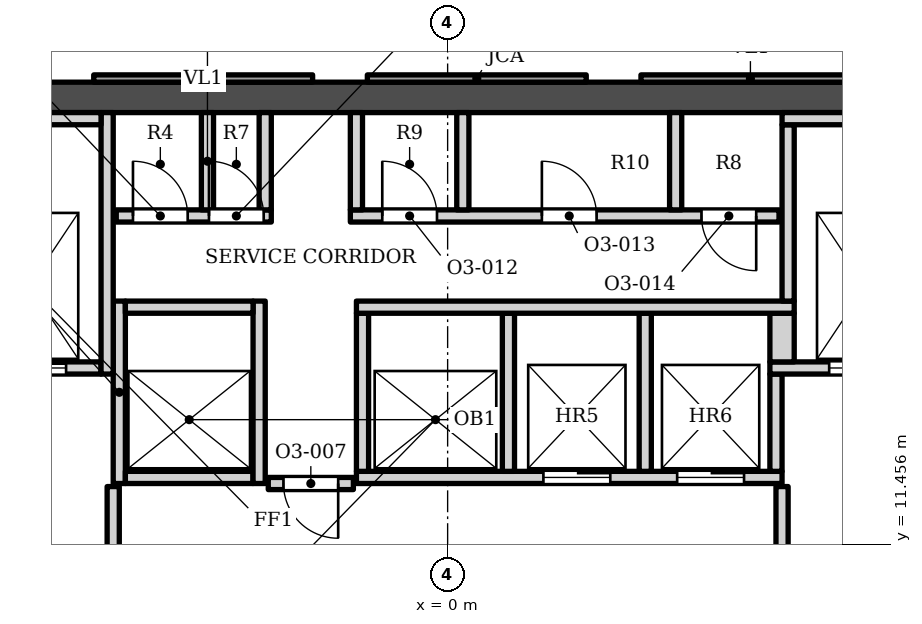
"""IFC4 building model, lengths in metres.
Left out: names, types, materials, properties, quantities, classifications, styles, units other than length and angle.
Written with IfcOpenShell. Run it as: python <this file> out.ifc"""

import sys

from ifc_helpers import new_model, si_unit, direction, frame, frame_2d, origin, place, context, subcontext, project, spatial, polyline, rectangle, outline, extrude, element, fill, save


model = new_model("IFC4")
c1 = context("Model", 3, precision=1e-05, world=origin(), true_north=direction((0.0, 1.0)))
c2 = subcontext(c1, "Body", "Model", "MODEL_VIEW")
j1 = project(units=[si_unit("LENGTHUNIT", "METRE"), si_unit("PLANEANGLEUNIT", "RADIAN")], contexts=[c1])
p1 = place(None, origin())
s1 = spatial("IfcSite", under=j1, at=p1, CompositionType="ELEMENT")
p2 = place(p1, origin())
s2 = spatial("IfcBuilding", under=s1, at=p2, CompositionType="ELEMENT")
p3 = place(p2, frame((0.0, 0.0, 168.0)))
s3 = spatial("IfcBuildingStorey", under=s2, at=p3, CompositionType="ELEMENT", Elevation=168.0)
p4 = place(p3, frame((-15.1, 18.802, 0.0), z_axis=(0.0, 0.0, 1.0), x_axis=(1.0, 0.0, 0.0)))
e1 = element("IfcWall", 1, at=p4, inside=s3, PredefinedType="SHEAR", context=c2, shape_type="SweptSolid", body=[
    extrude(rectangle(XDim=30.2, YDim=0.5, at=frame_2d((15.1, 0.0))), origin(), (0.0, 0.0, 1.0), 3.9),
])
p5 = place(p3, origin())
e2 = element("IfcWall", 2, at=p5, inside=s3, PredefinedType="ELEMENTEDWALL", context=c2, shape_type="SweptSolid", body=[
    extrude(outline(polyline([(3.18, 19.173), (3.18, 19.052), (6.78, 19.052), (6.78, 19.173), (3.18, 19.173)])), origin(), (0.0, 0.0, 1.0), 3.0),
])
p6 = place(p3, origin())
e3 = element("IfcWall", 3, at=p6, inside=s3, PredefinedType="SOLIDWALL", context=c2, shape_type="SweptSolid", body=[
    extrude(outline(polyline([(-1.32, 19.173), (-1.32, 19.052), (2.28, 19.052), (2.28, 19.173), (-1.32, 19.173)])), origin(), (0.0, 0.0, 1.0), 3.0),
])
p7 = place(p3, origin())
e4 = element("IfcWall", 4, at=p7, inside=s3, PredefinedType="ELEMENTEDWALL", context=c2, shape_type="SweptSolid", body=[
    extrude(outline(polyline([(-5.82, 19.173), (-5.82, 19.052), (-2.22, 19.052), (-2.22, 19.173), (-5.82, 19.173)])), origin(), (0.0, 0.0, 1.0), 3.0),
])
p8 = place(p3, frame((-5.5, 9.103, 0.0), z_axis=(0.0, 0.0, 1.0), x_axis=(0.0, 1.0, 0.0)))
e5 = element("IfcWall", 5, at=p8, inside=s3, PredefinedType="SOLIDWALL", context=c2, shape_type="SweptSolid", body=[
    extrude(rectangle(XDim=3.3, YDim=0.2, at=frame_2d((1.65, 0.0))), origin(), (0.0, 0.0, 1.0), 3.73),
])
p9 = place(p8, frame((0.85, 0.0, 0.0)))
e6 = element("IfcOpeningElement", 6, at=p9, cuts=e5, PredefinedType="OPENING", context=c2, shape_type="SweptSolid", body=[
    extrude(rectangle(XDim=1.4, YDim=2.1, at=frame_2d((0.7, 1.05))), frame((0.0, 0.11, 0.0), z_axis=(0.0, -1.0, 0.0), x_axis=(1.0, 0.0, 0.0)), (0.0, 0.0, 1.0), 0.22),
])
p10 = place(p3, frame((5.5, 9.103, 0.0), z_axis=(0.0, 0.0, 1.0), x_axis=(0.0, 1.0, 0.0)))
e7 = element("IfcWall", 7, at=p10, inside=s3, PredefinedType="SOLIDWALL", context=c2, shape_type="SweptSolid", body=[
    extrude(rectangle(XDim=3.3, YDim=0.2, at=frame_2d((1.65, 0.0))), origin(), (0.0, 0.0, 1.0), 3.73),
])
p11 = place(p10, frame((0.85, 0.0, 0.0)))
e8 = element("IfcOpeningElement", 8, at=p11, cuts=e7, PredefinedType="OPENING", context=c2, shape_type="SweptSolid", body=[
    extrude(rectangle(XDim=1.4, YDim=2.1, at=frame_2d((0.7, 1.05))), frame((0.0, 0.11, 0.0), z_axis=(0.0, -1.0, 0.0), x_axis=(1.0, 0.0, 0.0)), (0.0, 0.0, 1.0), 0.22),
])
p12 = place(p3, frame((-2.95, 12.453, 0.0), z_axis=(0.0, 0.0, 1.0), x_axis=(1.0, 0.0, 0.0)))
e9 = element("IfcWall", 9, at=p12, inside=s3, PredefinedType="SOLIDWALL", context=c2, shape_type="SweptSolid", body=[
    extrude(rectangle(XDim=1.4, YDim=0.2, at=frame_2d((0.7, 0.0))), origin(), (0.0, 0.0, 1.0), 3.73),
])
p13 = place(p12, frame((0.25, 0.0, 0.0)))
e10 = element("IfcOpeningElement", 10, at=p13, cuts=e9, PredefinedType="OPENING", context=c2, shape_type="SweptSolid", body=[
    extrude(rectangle(XDim=0.9, YDim=2.1, at=frame_2d((0.45, 1.05))), frame((0.0, 0.11, 0.0), z_axis=(0.0, -1.0, 0.0), x_axis=(1.0, 0.0, 0.0)), (0.0, 0.0, 1.0), 0.22),
])
p14 = place(p3, frame((-5.4, 12.453, 0.0), z_axis=(0.0, 0.0, 1.0), x_axis=(0.0, 1.0, 0.0)))
e11 = element("IfcWall", 11, at=p14, inside=s3, PredefinedType="SOLIDWALL", context=c2, shape_type="SweptSolid", body=[
    extrude(rectangle(XDim=3.0, YDim=0.2, at=frame_2d((1.5, 0.0))), origin(), (0.0, 0.0, 1.0), 3.73),
])
p15 = place(p3, frame((-5.3, 12.552, 0.0), z_axis=(0.0, 0.0, 1.0), x_axis=(1.0, 0.0, 0.0)))
e12 = element("IfcWall", 12, at=p15, inside=s3, PredefinedType="SOLIDWALL", context=c2, shape_type="SweptSolid", body=[
    extrude(rectangle(XDim=2.1, YDim=0.2, at=frame_2d((1.05, 0.0))), origin(), (0.0, 0.0, 1.0), 3.73),
])
p16 = place(p3, frame((-3.1, 12.453, 0.0), z_axis=(0.0, 0.0, 1.0), x_axis=(0.0, 1.0, 0.0)))
e13 = element("IfcWall", 13, at=p16, inside=s3, PredefinedType="SOLIDWALL", context=c2, shape_type="SweptSolid", body=[
    extrude(rectangle(XDim=3.0, YDim=0.2, at=frame_2d((1.5, 0.0))), origin(), (0.0, 0.0, 1.0), 3.73),
])
p17 = place(p3, frame((-1.5, 12.552, 0.0), z_axis=(0.0, 0.0, 1.0), x_axis=(1.0, 0.0, 0.0)))
e14 = element("IfcWall", 14, at=p17, inside=s3, PredefinedType="SOLIDWALL", context=c2, shape_type="SweptSolid", body=[
    extrude(rectangle(XDim=7.0, YDim=0.2, at=frame_2d((3.5, 0.0))), origin(), (0.0, 0.0, 1.0), 3.73),
])
p18 = place(p17, frame((3.075, 0.0, 0.0)))
e15 = element("IfcOpeningElement", 15, at=p18, cuts=e14, PredefinedType="OPENING", context=c2, shape_type="SweptSolid", body=[
    extrude(rectangle(XDim=1.1, YDim=2.1, at=frame_2d((0.55, 1.05))), frame((0.0, 0.11, 0.0), z_axis=(0.0, -1.0, 0.0), x_axis=(1.0, 0.0, 0.0)), (0.0, 0.0, 1.0), 0.22),
])
p19 = place(p17, frame((5.275, 0.0, 0.0)))
e16 = element("IfcOpeningElement", 16, at=p19, cuts=e14, PredefinedType="OPENING", context=c2, shape_type="SweptSolid", body=[
    extrude(rectangle(XDim=1.1, YDim=2.1, at=frame_2d((0.55, 1.05))), frame((0.0, 0.11, 0.0), z_axis=(0.0, -1.0, 0.0), x_axis=(1.0, 0.0, 0.0)), (0.0, 0.0, 1.0), 0.22),
])
for number, where, z_axis, x_axis in (
    (17, (-1.4, 12.653, 0.0), (0.0, 0.0, 1.0), (0.0, 1.0, 0.0)),
    (18, (1.0, 12.653, 0.0), (0.0, 0.0, 1.0), (0.0, 1.0, 0.0)),
    (19, (3.25, 12.653, 0.0), (0.0, 0.0, 1.0), (0.0, 1.0, 0.0)),
):
    element("IfcWall", number, at=place(p3, frame(where, z_axis=z_axis, x_axis=x_axis)), inside=s3, PredefinedType="SOLIDWALL", context=c2, shape_type="SweptSolid", body=[
        extrude(rectangle(XDim=2.6, YDim=0.2, at=frame_2d((1.3, 0.0))), origin(), (0.0, 0.0, 1.0), 3.73),
    ])
p20 = place(p3, frame((5.4, 12.653, 0.0), z_axis=(0.0, 0.0, 1.0), x_axis=(0.0, 1.0, 0.0)))
e20 = element("IfcWall", 20, at=p20, inside=s3, PredefinedType="SOLIDWALL", context=c2, shape_type="SweptSolid", body=[
    extrude(rectangle(XDim=1.6, YDim=0.2, at=frame_2d((0.8, 0.0))), origin(), (0.0, 0.0, 1.0), 3.73),
])
p21 = place(p3, frame((-8.05, 14.353, 0.0), z_axis=(0.0, 0.0, 1.0), x_axis=(1.0, 0.0, 0.0)))
e21 = element("IfcWall", 21, at=p21, inside=s3, PredefinedType="SOLIDWALL", context=c2, shape_type="SweptSolid", body=[
    extrude(rectangle(XDim=2.35, YDim=0.2, at=frame_2d((1.175, 0.0))), origin(), (0.0, 0.0, 1.0), 3.73),
])
p22 = place(p21, frame((0.575, 0.0, 0.0)))
e22 = element("IfcOpeningElement", 22, at=p22, cuts=e21, PredefinedType="OPENING", context=c2, shape_type="SweptSolid", body=[
    extrude(rectangle(XDim=1.2, YDim=2.1, at=frame_2d((0.6, 1.05))), frame((0.0, 0.11, 0.0), z_axis=(0.0, -1.0, 0.0), x_axis=(1.0, 0.0, 0.0)), (0.0, 0.0, 1.0), 0.22),
])
p23 = place(p3, frame((-5.6, 14.253, 0.0), z_axis=(0.0, 0.0, 1.0), x_axis=(0.0, 1.0, 0.0)))
e23 = element("IfcWall", 23, at=p23, inside=s3, PredefinedType="SOLIDWALL", context=c2, shape_type="SweptSolid", body=[
    extrude(rectangle(XDim=4.3, YDim=0.2, at=frame_2d((2.15, 0.0))), origin(), (0.0, 0.0, 1.0), 3.73),
])
p24 = place(p3, frame((5.3, 14.353, 0.0), z_axis=(0.0, 0.0, 1.0), x_axis=(1.0, 0.0, 0.0)))
e24 = element("IfcWall", 24, at=p24, inside=s3, PredefinedType="SOLIDWALL", context=c2, shape_type="SweptSolid", body=[
    extrude(rectangle(XDim=2.75, YDim=0.2, at=frame_2d((1.375, 0.0))), origin(), (0.0, 0.0, 1.0), 3.73),
])
p25 = place(p24, frame((0.975, 0.0, 0.0)))
e25 = element("IfcOpeningElement", 25, at=p25, cuts=e24, PredefinedType="OPENING", context=c2, shape_type="SweptSolid", body=[
    extrude(rectangle(XDim=1.2, YDim=2.1, at=frame_2d((0.6, 1.05))), frame((0.0, 0.11, 0.0), z_axis=(0.0, -1.0, 0.0), x_axis=(1.0, 0.0, 0.0)), (0.0, 0.0, 1.0), 0.22),
])
p26 = place(p3, frame((5.5, 14.453, 0.0), z_axis=(0.0, 0.0, 1.0), x_axis=(0.0, 1.0, 0.0)))
e26 = element("IfcWall", 26, at=p26, inside=s3, PredefinedType="SOLIDWALL", context=c2, shape_type="SweptSolid", body=[
    extrude(rectangle(XDim=0.8, YDim=0.4, at=frame_2d((0.4, 0.0))), origin(), (0.0, 0.0, 1.0), 3.73),
])
p27 = place(p3, frame((-5.3, 15.353, 0.0), z_axis=(0.0, 0.0, 1.0), x_axis=(1.0, 0.0, 0.0)))
e27 = element("IfcWall", 27, at=p27, inside=s3, PredefinedType="SOLIDWALL", context=c2, shape_type="SweptSolid", body=[
    extrude(rectangle(XDim=2.1, YDim=0.2, at=frame_2d((1.05, 0.0))), origin(), (0.0, 0.0, 1.0), 3.73),
])
p28 = place(p3, frame((-1.5, 15.353, 0.0), z_axis=(0.0, 0.0, 1.0), x_axis=(1.0, 0.0, 0.0)))
e28 = element("IfcWall", 28, at=p28, inside=s3, PredefinedType="SOLIDWALL", context=c2, shape_type="SweptSolid", body=[
    extrude(rectangle(XDim=7.2, YDim=0.2, at=frame_2d((3.6, 0.0))), origin(), (0.0, 0.0, 1.0), 3.73),
])
p29 = place(p3, frame((5.6, 15.453, 0.0), z_axis=(0.0, 0.0, 1.0), x_axis=(0.0, 1.0, 0.0)))
e29 = element("IfcWall", 29, at=p29, inside=s3, PredefinedType="SOLIDWALL", context=c2, shape_type="SweptSolid", body=[
    extrude(rectangle(XDim=2.9, YDim=0.2, at=frame_2d((1.45, 0.0))), origin(), (0.0, 0.0, 1.0), 3.73),
])
p30 = place(p3, frame((-5.45, 16.853, 0.0), z_axis=(0.0, 0.0, 1.0), x_axis=(1.0, 0.0, 0.0)))
e30 = element("IfcWall", 30, at=p30, inside=s3, PredefinedType="SOLIDWALL", context=c2, shape_type="SweptSolid", body=[
    extrude(rectangle(XDim=2.55, YDim=0.2, at=frame_2d((1.275, 0.0))), origin(), (0.0, 0.0, 1.0), 3.73),
])
p31 = place(p30, frame((0.275, 0.0, 0.0)))
e31 = element("IfcOpeningElement", 31, at=p31, cuts=e30, PredefinedType="OPENING", context=c2, shape_type="SweptSolid", body=[
    extrude(rectangle(XDim=0.9, YDim=2.1, at=frame_2d((0.45, 1.05))), frame((0.0, 0.11, 0.0), z_axis=(0.0, -1.0, 0.0), x_axis=(1.0, 0.0, 0.0)), (0.0, 0.0, 1.0), 0.22),
])
p32 = place(p30, frame((1.525, 0.0, 0.0)))
e32 = element("IfcOpeningElement", 32, at=p32, cuts=e30, PredefinedType="OPENING", context=c2, shape_type="SweptSolid", body=[
    extrude(rectangle(XDim=0.9, YDim=2.1, at=frame_2d((0.45, 1.05))), frame((0.0, 0.11, 0.0), z_axis=(0.0, -1.0, 0.0), x_axis=(1.0, 0.0, 0.0)), (0.0, 0.0, 1.0), 0.22),
])
p33 = place(p3, frame((-1.6, 16.853, 0.0), z_axis=(0.0, 0.0, 1.0), x_axis=(1.0, 0.0, 0.0)))
e33 = element("IfcWall", 33, at=p33, inside=s3, PredefinedType="SOLIDWALL", context=c2, shape_type="SweptSolid", body=[
    extrude(rectangle(XDim=7.05, YDim=0.2, at=frame_2d((3.525, 0.0))), origin(), (0.0, 0.0, 1.0), 3.73),
])
p34 = place(p33, frame((0.525, 0.0, 0.0)))
e34 = element("IfcOpeningElement", 34, at=p34, cuts=e33, PredefinedType="OPENING", context=c2, shape_type="SweptSolid", body=[
    extrude(rectangle(XDim=0.9, YDim=2.1, at=frame_2d((0.45, 1.05))), frame((0.0, 0.11, 0.0), z_axis=(0.0, -1.0, 0.0), x_axis=(1.0, 0.0, 0.0)), (0.0, 0.0, 1.0), 0.22),
])
p35 = place(p33, frame((3.15, 0.0, 0.0)))
e35 = element("IfcOpeningElement", 35, at=p35, cuts=e33, PredefinedType="OPENING", context=c2, shape_type="SweptSolid", body=[
    extrude(rectangle(XDim=0.9, YDim=2.1, at=frame_2d((0.45, 1.05))), frame((0.0, 0.11, 0.0), z_axis=(0.0, -1.0, 0.0), x_axis=(1.0, 0.0, 0.0)), (0.0, 0.0, 1.0), 0.22),
])
p36 = place(p33, frame((5.775, 0.0, 0.0)))
e36 = element("IfcOpeningElement", 36, at=p36, cuts=e33, PredefinedType="OPENING", context=c2, shape_type="SweptSolid", body=[
    extrude(rectangle(XDim=0.9, YDim=2.1, at=frame_2d((0.45, 1.05))), frame((0.0, 0.11, 0.0), z_axis=(0.0, -1.0, 0.0), x_axis=(1.0, 0.0, 0.0)), (0.0, 0.0, 1.0), 0.22),
])
for number, where, z_axis, x_axis in (
    (37, (-3.95, 16.953, 0.0), (0.0, 0.0, 1.0), (0.0, 1.0, 0.0)),
    (38, (-3.0, 16.953, 0.0), (0.0, 0.0, 1.0), (0.0, 1.0, 0.0)),
    (39, (-1.5, 16.953, 0.0), (0.0, 0.0, 1.0), (0.0, 1.0, 0.0)),
    (40, (0.25, 16.953, 0.0), (0.0, 0.0, 1.0), (0.0, 1.0, 0.0)),
    (41, (3.75, 16.953, 0.0), (0.0, 0.0, 1.0), (0.0, 1.0, 0.0)),
):
    element("IfcWall", number, at=place(p3, frame(where, z_axis=z_axis, x_axis=x_axis)), inside=s3, PredefinedType="PARTITIONING", context=c2, shape_type="SweptSolid", body=[
        extrude(rectangle(XDim=1.6, YDim=0.2, at=frame_2d((0.8, 0.0))), origin(), (0.0, 0.0, 1.0), 3.73),
    ])
p37 = place(p3, frame((-8.05, 18.453, 0.0), z_axis=(0.0, 0.0, 1.0), x_axis=(1.0, 0.0, 0.0)))
e42 = element("IfcWall", 42, at=p37, inside=s3, PredefinedType="SOLIDWALL", context=c2, shape_type="SweptSolid", body=[
    extrude(rectangle(XDim=2.35, YDim=0.2, at=frame_2d((1.175, 0.0))), origin(), (0.0, 0.0, 1.0), 3.73),
])
p38 = place(p3, frame((5.5, 18.453, 0.0), z_axis=(0.0, 0.0, 1.0), x_axis=(1.0, 0.0, 0.0)))
e43 = element("IfcWall", 43, at=p38, inside=s3, PredefinedType="SOLIDWALL", context=c2, shape_type="SweptSolid", body=[
    extrude(rectangle(XDim=2.55, YDim=0.2, at=frame_2d((1.275, 0.0))), origin(), (0.0, 0.0, 1.0), 3.73),
])
p39 = place(p18, origin())
e44 = element("IfcDoor", 44, at=p39, inside=s3, OperationType="DOUBLE_DOOR_SLIDING", PredefinedType="DOOR", context=c2, shape_type="SweptSolid", body=[
    extrude(rectangle(XDim=1.1, YDim=2.1, at=frame_2d((0.55, 1.05))), frame((0.0, 0.025, 0.0), z_axis=(0.0, -1.0, 0.0), x_axis=(1.0, 0.0, 0.0)), (0.0, 0.0, 1.0), 0.05),
])
fill(e15, e44)
p40 = place(p19, origin())
e45 = element("IfcDoor", 45, at=p40, inside=s3, OperationType="DOUBLE_DOOR_SLIDING", PredefinedType="DOOR", context=c2, shape_type="SweptSolid", body=[
    extrude(rectangle(XDim=1.1, YDim=2.1, at=frame_2d((0.55, 1.05))), frame((0.0, 0.025, 0.0), z_axis=(0.0, -1.0, 0.0), x_axis=(1.0, 0.0, 0.0)), (0.0, 0.0, 1.0), 0.05),
])
fill(e16, e45)
p41 = place(p22, origin())
e46 = element("IfcDoor", 46, at=p41, inside=s3, OperationType="DOUBLE_DOOR_SLIDING", PredefinedType="DOOR", context=c2, shape_type="SweptSolid", body=[
    extrude(rectangle(XDim=1.2, YDim=2.1, at=frame_2d((0.6, 1.05))), frame((0.0, 0.025, 0.0), z_axis=(0.0, -1.0, 0.0), x_axis=(1.0, 0.0, 0.0)), (0.0, 0.0, 1.0), 0.05),
])
fill(e22, e46)
p42 = place(p25, origin())
e47 = element("IfcDoor", 47, at=p42, inside=s3, OperationType="DOUBLE_DOOR_SLIDING", PredefinedType="DOOR", context=c2, shape_type="SweptSolid", body=[
    extrude(rectangle(XDim=1.2, YDim=2.1, at=frame_2d((0.6, 1.05))), frame((0.0, 0.025, 0.0), z_axis=(0.0, -1.0, 0.0), x_axis=(1.0, 0.0, 0.0)), (0.0, 0.0, 1.0), 0.05),
])
fill(e25, e47)
p43 = place(p13, origin())
e48 = element("IfcDoor", 48, at=p43, inside=s3, OperationType="SINGLE_SWING_RIGHT", PredefinedType="DOOR", context=c2, shape_type="SweptSolid", body=[
    extrude(rectangle(XDim=0.9, YDim=2.1, at=frame_2d((0.45, 1.05))), frame((0.0, 0.025, 0.0), z_axis=(0.0, -1.0, 0.0), x_axis=(1.0, 0.0, 0.0)), (0.0, 0.0, 1.0), 0.05),
])
fill(e10, e48)
p44 = place(p31, origin())
e49 = element("IfcDoor", 49, at=p44, inside=s3, OperationType="SINGLE_SWING_LEFT", PredefinedType="DOOR", context=c2, shape_type="SweptSolid", body=[
    extrude(rectangle(XDim=0.9, YDim=2.1, at=frame_2d((0.45, 1.05))), frame((0.0, 0.025, 0.0), z_axis=(0.0, -1.0, 0.0), x_axis=(1.0, 0.0, 0.0)), (0.0, 0.0, 1.0), 0.05),
])
fill(e31, e49)
p45 = place(p32, origin())
e50 = element("IfcDoor", 50, at=p45, inside=s3, OperationType="SINGLE_SWING_LEFT", PredefinedType="DOOR", context=c2, shape_type="SweptSolid", body=[
    extrude(rectangle(XDim=0.9, YDim=2.1, at=frame_2d((0.45, 1.05))), frame((0.0, 0.025, 0.0), z_axis=(0.0, -1.0, 0.0), x_axis=(1.0, 0.0, 0.0)), (0.0, 0.0, 1.0), 0.05),
])
fill(e32, e50)
p46 = place(p34, origin())
e51 = element("IfcDoor", 51, at=p46, inside=s3, OperationType="SINGLE_SWING_LEFT", PredefinedType="DOOR", context=c2, shape_type="SweptSolid", body=[
    extrude(rectangle(XDim=0.9, YDim=2.1, at=frame_2d((0.45, 1.05))), frame((0.0, 0.025, 0.0), z_axis=(0.0, -1.0, 0.0), x_axis=(1.0, 0.0, 0.0)), (0.0, 0.0, 1.0), 0.05),
])
fill(e34, e51)
p47 = place(p35, origin())
e52 = element("IfcDoor", 52, at=p47, inside=s3, OperationType="SINGLE_SWING_LEFT", PredefinedType="DOOR", context=c2, shape_type="SweptSolid", body=[
    extrude(rectangle(XDim=0.9, YDim=2.1, at=frame_2d((0.45, 1.05))), frame((0.0, 0.025, 0.0), z_axis=(0.0, -1.0, 0.0), x_axis=(1.0, 0.0, 0.0)), (0.0, 0.0, 1.0), 0.05),
])
fill(e35, e52)
p48 = place(p36, origin())
e53 = element("IfcDoor", 53, at=p48, inside=s3, OperationType="SINGLE_SWING_RIGHT", PredefinedType="DOOR", context=c2, shape_type="SweptSolid", body=[
    extrude(rectangle(XDim=0.9, YDim=2.1, at=frame_2d((0.45, 1.05))), frame((0.0, 0.025, 0.0), z_axis=(0.0, -1.0, 0.0), x_axis=(1.0, 0.0, 0.0)), (0.0, 0.0, 1.0), 0.05),
])
fill(e36, e53)
save(model, sys.argv[1])
